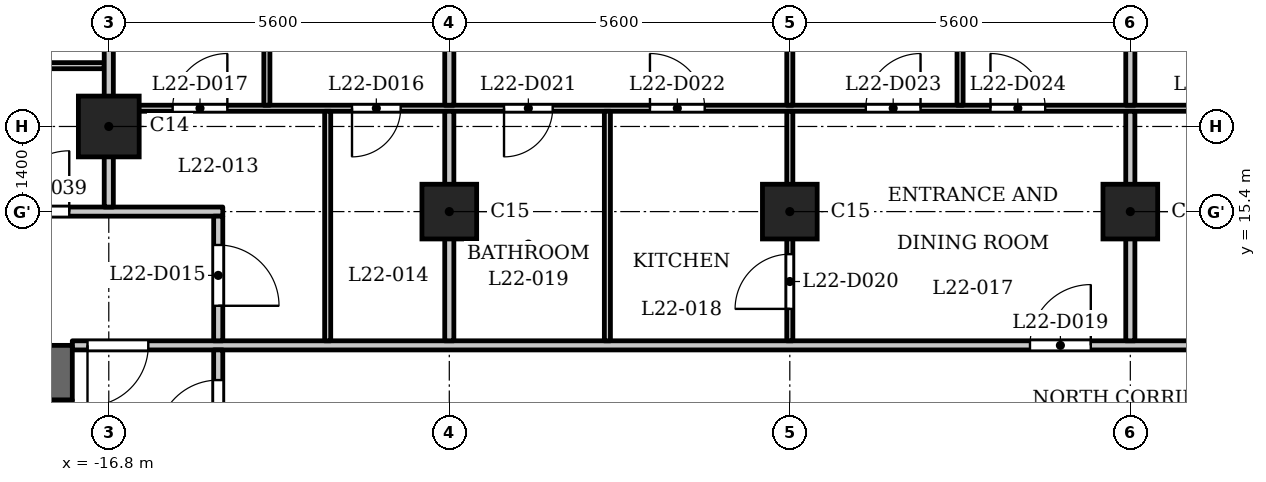
"""IFC4 building model, lengths in metres.
Left out: names, types, materials, properties, quantities, classifications, styles, units other than length and angle.
Written with IfcOpenShell. Run it as: python <this file> out.ifc"""

import sys

from ifc_helpers import new_model, si_unit, direction, frame, frame_2d, origin, origin_2d, place, context, subcontext, project, spatial, rectangle, extrude, element, fill, save


model = new_model("IFC4")
c1 = context("Model", 3, precision=1e-05, world=origin(), true_north=direction((0.0, 1.0)))
c2 = subcontext(c1, "Body", "Model", "MODEL_VIEW")
j1 = project(units=[si_unit("LENGTHUNIT", "METRE"), si_unit("PLANEANGLEUNIT", "RADIAN")], contexts=[c1])
p1 = place(None, origin())
s1 = spatial("IfcSite", under=j1, at=p1, CompositionType="ELEMENT")
p2 = place(p1, origin())
s2 = spatial("IfcBuilding", under=s1, at=p2, CompositionType="ELEMENT")
p3 = place(p2, frame((0.0, 0.0, 90.3)))
s3 = spatial("IfcBuildingStorey", under=s2, at=p3, CompositionType="ELEMENT", Elevation=90.3)
p4 = place(p3, frame((-16.8, 16.8, 0.0), z_axis=(0.0, 0.0, 1.0), x_axis=(1.0, 0.0, 0.0)))
e1 = element("IfcColumn", 1, at=p4, inside=s3, PredefinedType="COLUMN", context=c2, shape_type="SweptSolid", body=[
    extrude(rectangle(XDim=1.0, YDim=1.0, at=origin_2d()), origin(), (0.0, 0.0, 1.0), 3.5),
])
for number, where, z_axis, x_axis in (
    (2, (-11.2, 15.4, 0.0), (0.0, 0.0, 1.0), (1.0, 0.0, 0.0)),
    (3, (-5.6, 15.4, 0.0), (0.0, 0.0, 1.0), (1.0, 0.0, 0.0)),
    (4, (0.0, 15.4, 0.0), (0.0, 0.0, 1.0), (1.0, 0.0, 0.0)),
):
    element("IfcColumn", number, at=place(p3, frame(where, z_axis=z_axis, x_axis=x_axis)), inside=s3, PredefinedType="COLUMN", context=c2, shape_type="SweptSolid", body=[
        extrude(rectangle(XDim=0.9, YDim=0.9, at=origin_2d()), origin(), (0.0, 0.0, 1.0), 3.5),
    ])
p5 = place(p3, frame((-17.4, 12.75, 0.0), z_axis=(0.0, 0.0, 1.0), x_axis=(-1.0, 0.0, 0.0)))
e5 = element("IfcWall", 5, at=p5, inside=s3, PredefinedType="SHEAR", context=c2, shape_type="SweptSolid", body=[
    extrude(rectangle(XDim=10.4, YDim=0.9, at=frame_2d((5.2, 0.0))), origin(), (0.0, 0.0, 1.0), 3.2),
])
p6 = place(p3, frame((-17.6, -12.3, 0.0), z_axis=(0.0, 0.0, 1.0), x_axis=(0.0, 1.0, 0.0)))
e6 = element("IfcWall", 6, at=p6, inside=s3, PredefinedType="SHEAR", context=c2, shape_type="SweptSolid", body=[
    extrude(rectangle(XDim=24.6, YDim=0.4, at=frame_2d((12.3, 0.0))), origin(), (0.0, 0.0, 1.0), 3.2),
])
p7 = place(p6, frame((6.0, 0.0, 0.0)))
e7 = element("IfcOpeningElement", 7, at=p7, cuts=e6, PredefinedType="OPENING", context=c2, shape_type="SweptSolid", body=[
    extrude(rectangle(XDim=1.1, YDim=2.1, at=frame_2d((0.55, 1.05))), frame((0.0, 0.21, 0.0), z_axis=(0.0, -1.0, 0.0), x_axis=(1.0, 0.0, 0.0)), (0.0, 0.0, 1.0), 0.42),
])
p8 = place(p6, frame((8.4, 0.0, 0.0)))
e8 = element("IfcOpeningElement", 8, at=p8, cuts=e6, PredefinedType="OPENING", context=c2, shape_type="SweptSolid", body=[
    extrude(rectangle(XDim=1.1, YDim=2.1, at=frame_2d((0.55, 1.05))), frame((0.0, 0.21, 0.0), z_axis=(0.0, -1.0, 0.0), x_axis=(1.0, 0.0, 0.0)), (0.0, 0.0, 1.0), 0.42),
])
p9 = place(p6, frame((10.8, 0.0, 0.0)))
e9 = element("IfcOpeningElement", 9, at=p9, cuts=e6, PredefinedType="OPENING", context=c2, shape_type="SweptSolid", body=[
    extrude(rectangle(XDim=1.1, YDim=2.1, at=frame_2d((0.55, 1.05))), frame((0.0, 0.21, 0.0), z_axis=(0.0, -1.0, 0.0), x_axis=(1.0, 0.0, 0.0)), (0.0, 0.0, 1.0), 0.42),
])
p10 = place(p6, frame((16.75, 0.0, 0.0)))
e10 = element("IfcOpeningElement", 10, at=p10, cuts=e6, PredefinedType="OPENING", context=c2, shape_type="SweptSolid", body=[
    extrude(rectangle(XDim=0.9, YDim=2.1, at=frame_2d((0.45, 1.05))), frame((0.0, 0.21, 0.0), z_axis=(0.0, -1.0, 0.0), x_axis=(1.0, 0.0, 0.0)), (0.0, 0.0, 1.0), 0.42),
])
p11 = place(p6, frame((22.8, 0.0, 0.0)))
e11 = element("IfcOpeningElement", 11, at=p11, cuts=e6, PredefinedType="OPENING", context=c2, shape_type="SweptSolid", body=[
    extrude(rectangle(XDim=1.1, YDim=2.1, at=frame_2d((0.55, 1.05))), frame((0.0, 0.21, 0.0), z_axis=(0.0, -1.0, 0.0), x_axis=(1.0, 0.0, 0.0)), (0.0, 0.0, 1.0), 0.42),
])
p12 = place(p6, frame((0.7, 0.0, 0.0)))
e12 = element("IfcOpeningElement", 12, at=p12, cuts=e6, PredefinedType="OPENING", context=c2, shape_type="SweptSolid", body=[
    extrude(rectangle(XDim=1.1, YDim=2.1, at=frame_2d((0.55, 1.05))), frame((0.0, 0.21, 0.0), z_axis=(0.0, -1.0, 0.0), x_axis=(1.0, 0.0, 0.0)), (0.0, 0.0, 1.0), 0.42),
])
p13 = place(p6, frame((12.775, 0.0, 0.0)))
e13 = element("IfcOpeningElement", 13, at=p13, cuts=e6, PredefinedType="OPENING", context=c2, shape_type="SweptSolid", body=[
    extrude(rectangle(XDim=1.8, YDim=2.1, at=frame_2d((0.9, 1.05))), frame((0.0, 0.21, 0.0), z_axis=(0.0, -1.0, 0.0), x_axis=(1.0, 0.0, 0.0)), (0.0, 0.0, 1.0), 0.42),
])
p14 = place(p3, frame((-17.4, 13.2, 0.0), z_axis=(0.0, 0.0, 1.0), x_axis=(1.0, 0.0, 0.0)))
e14 = element("IfcWall", 14, at=p14, inside=s3, PredefinedType="PARTITIONING", context=c2, shape_type="SweptSolid", body=[
    extrude(rectangle(XDim=34.8, YDim=0.15, at=frame_2d((17.4, 0.0))), origin(), (0.0, 0.0, 1.0), 3.2),
])
p15 = place(p14, frame((0.25, 0.0, 0.0)))
e15 = element("IfcOpeningElement", 15, at=p15, cuts=e14, PredefinedType="OPENING", context=c2, shape_type="SweptSolid", body=[
    extrude(rectangle(XDim=1.0, YDim=2.1, at=frame_2d((0.5, 1.05))), frame((0.0, 0.085, 0.0), z_axis=(0.0, -1.0, 0.0), x_axis=(1.0, 0.0, 0.0)), (0.0, 0.0, 1.0), 0.17),
])
p16 = place(p14, frame((33.65, 0.0, 0.0)))
e16 = element("IfcOpeningElement", 16, at=p16, cuts=e14, PredefinedType="OPENING", context=c2, shape_type="SweptSolid", body=[
    extrude(rectangle(XDim=1.0, YDim=2.1, at=frame_2d((0.5, 1.05))), frame((0.0, 0.085, 0.0), z_axis=(0.0, -1.0, 0.0), x_axis=(1.0, 0.0, 0.0)), (0.0, 0.0, 1.0), 0.17),
])
p17 = place(p14, frame((15.75, 0.0, 0.0)))
e17 = element("IfcOpeningElement", 17, at=p17, cuts=e14, PredefinedType="OPENING", context=c2, shape_type="SweptSolid", body=[
    extrude(rectangle(XDim=1.0, YDim=2.1, at=frame_2d((0.5, 1.05))), frame((0.0, 0.085, 0.0), z_axis=(0.0, -1.0, 0.0), x_axis=(1.0, 0.0, 0.0)), (0.0, 0.0, 1.0), 0.17),
])
p18 = place(p14, frame((21.35, 0.0, 0.0)))
e18 = element("IfcOpeningElement", 18, at=p18, cuts=e14, PredefinedType="OPENING", context=c2, shape_type="SweptSolid", body=[
    extrude(rectangle(XDim=1.0, YDim=2.1, at=frame_2d((0.5, 1.05))), frame((0.0, 0.085, 0.0), z_axis=(0.0, -1.0, 0.0), x_axis=(1.0, 0.0, 0.0)), (0.0, 0.0, 1.0), 0.17),
])
p19 = place(p3, frame((-27.484, 15.4, 0.0), z_axis=(0.0, 0.0, 1.0), x_axis=(1.0, 0.0, 0.0)))
e19 = element("IfcWall", 19, at=p19, inside=s3, PredefinedType="PARTITIONING", context=c2, shape_type="SweptSolid", body=[
    extrude(rectangle(XDim=12.559, YDim=0.15, at=frame_2d((6.279, 0.0))), origin(), (0.0, 0.0, 1.0), 3.2),
])
p20 = place(p19, frame((9.034, 0.0, 0.0)))
e20 = element("IfcOpeningElement", 20, at=p20, cuts=e19, PredefinedType="OPENING", context=c2, shape_type="SweptSolid", body=[
    extrude(rectangle(XDim=1.0, YDim=2.1, at=frame_2d((0.5, 1.05))), frame((0.0, 0.085, 0.0), z_axis=(0.0, -1.0, 0.0), x_axis=(1.0, 0.0, 0.0)), (0.0, 0.0, 1.0), 0.17),
])
p21 = place(p3, frame((-16.725, 17.1, 0.0), z_axis=(0.0, 0.0, 1.0), x_axis=(1.0, 0.0, 0.0)))
e21 = element("IfcWall", 21, at=p21, inside=s3, PredefinedType="PARTITIONING", context=c2, shape_type="SweptSolid", body=[
    extrude(rectangle(XDim=33.45, YDim=0.1, at=frame_2d((16.725, 0.0))), origin(), (0.0, 0.0, 1.0), 3.2),
])
p22 = place(p21, frame((3.925, 0.0, 0.0)))
e22 = element("IfcOpeningElement", 22, at=p22, cuts=e21, PredefinedType="OPENING", context=c2, shape_type="SweptSolid", body=[
    extrude(rectangle(XDim=0.8, YDim=2.1, at=frame_2d((0.4, 1.05))), frame((0.0, 0.06, 0.0), z_axis=(0.0, -1.0, 0.0), x_axis=(1.0, 0.0, 0.0)), (0.0, 0.0, 1.0), 0.12),
])
p23 = place(p21, frame((0.975, 0.0, 0.0)))
e23 = element("IfcOpeningElement", 23, at=p23, cuts=e21, PredefinedType="OPENING", context=c2, shape_type="SweptSolid", body=[
    extrude(rectangle(XDim=0.9, YDim=2.1, at=frame_2d((0.45, 1.05))), frame((0.0, 0.06, 0.0), z_axis=(0.0, -1.0, 0.0), x_axis=(1.0, 0.0, 0.0)), (0.0, 0.0, 1.0), 0.12),
])
p24 = place(p21, frame((6.425, 0.0, 0.0)))
e24 = element("IfcOpeningElement", 24, at=p24, cuts=e21, PredefinedType="OPENING", context=c2, shape_type="SweptSolid", body=[
    extrude(rectangle(XDim=0.8, YDim=2.1, at=frame_2d((0.4, 1.05))), frame((0.0, 0.06, 0.0), z_axis=(0.0, -1.0, 0.0), x_axis=(1.0, 0.0, 0.0)), (0.0, 0.0, 1.0), 0.12),
])
p25 = place(p21, frame((8.825, 0.0, 0.0)))
e25 = element("IfcOpeningElement", 25, at=p25, cuts=e21, PredefinedType="OPENING", context=c2, shape_type="SweptSolid", body=[
    extrude(rectangle(XDim=0.9, YDim=2.1, at=frame_2d((0.45, 1.05))), frame((0.0, 0.06, 0.0), z_axis=(0.0, -1.0, 0.0), x_axis=(1.0, 0.0, 0.0)), (0.0, 0.0, 1.0), 0.12),
])
p26 = place(p21, frame((12.375, 0.0, 0.0)))
e26 = element("IfcOpeningElement", 26, at=p26, cuts=e21, PredefinedType="OPENING", context=c2, shape_type="SweptSolid", body=[
    extrude(rectangle(XDim=0.9, YDim=2.1, at=frame_2d((0.45, 1.05))), frame((0.0, 0.06, 0.0), z_axis=(0.0, -1.0, 0.0), x_axis=(1.0, 0.0, 0.0)), (0.0, 0.0, 1.0), 0.12),
])
p27 = place(p21, frame((14.425, 0.0, 0.0)))
e27 = element("IfcOpeningElement", 27, at=p27, cuts=e21, PredefinedType="OPENING", context=c2, shape_type="SweptSolid", body=[
    extrude(rectangle(XDim=0.9, YDim=2.1, at=frame_2d((0.45, 1.05))), frame((0.0, 0.06, 0.0), z_axis=(0.0, -1.0, 0.0), x_axis=(1.0, 0.0, 0.0)), (0.0, 0.0, 1.0), 0.12),
])
p28 = place(p21, frame((26.225, 0.0, 0.0)))
e28 = element("IfcOpeningElement", 28, at=p28, cuts=e21, PredefinedType="OPENING", context=c2, shape_type="SweptSolid", body=[
    extrude(rectangle(XDim=0.8, YDim=2.1, at=frame_2d((0.4, 1.05))), frame((0.0, 0.06, 0.0), z_axis=(0.0, -1.0, 0.0), x_axis=(1.0, 0.0, 0.0)), (0.0, 0.0, 1.0), 0.12),
])
p29 = place(p21, frame((23.025, 0.0, 0.0)))
e29 = element("IfcOpeningElement", 29, at=p29, cuts=e21, PredefinedType="OPENING", context=c2, shape_type="SweptSolid", body=[
    extrude(rectangle(XDim=0.9, YDim=2.1, at=frame_2d((0.45, 1.05))), frame((0.0, 0.06, 0.0), z_axis=(0.0, -1.0, 0.0), x_axis=(1.0, 0.0, 0.0)), (0.0, 0.0, 1.0), 0.12),
])
p30 = place(p21, frame((17.775, 0.0, 0.0)))
e30 = element("IfcOpeningElement", 30, at=p30, cuts=e21, PredefinedType="OPENING", context=c2, shape_type="SweptSolid", body=[
    extrude(rectangle(XDim=0.9, YDim=2.1, at=frame_2d((0.45, 1.05))), frame((0.0, 0.06, 0.0), z_axis=(0.0, -1.0, 0.0), x_axis=(1.0, 0.0, 0.0)), (0.0, 0.0, 1.0), 0.12),
])
p31 = place(p21, frame((20.025, 0.0, 0.0)))
e31 = element("IfcOpeningElement", 31, at=p31, cuts=e21, PredefinedType="OPENING", context=c2, shape_type="SweptSolid", body=[
    extrude(rectangle(XDim=0.9, YDim=2.1, at=frame_2d((0.45, 1.05))), frame((0.0, 0.06, 0.0), z_axis=(0.0, -1.0, 0.0), x_axis=(1.0, 0.0, 0.0)), (0.0, 0.0, 1.0), 0.12),
])
p32 = place(p21, frame((28.825, 0.0, 0.0)))
e32 = element("IfcOpeningElement", 32, at=p32, cuts=e21, PredefinedType="OPENING", context=c2, shape_type="SweptSolid", body=[
    extrude(rectangle(XDim=0.8, YDim=2.1, at=frame_2d((0.4, 1.05))), frame((0.0, 0.06, 0.0), z_axis=(0.0, -1.0, 0.0), x_axis=(1.0, 0.0, 0.0)), (0.0, 0.0, 1.0), 0.12),
])
p33 = place(p21, frame((31.975, 0.0, 0.0)))
e33 = element("IfcOpeningElement", 33, at=p33, cuts=e21, PredefinedType="OPENING", context=c2, shape_type="SweptSolid", body=[
    extrude(rectangle(XDim=0.9, YDim=2.1, at=frame_2d((0.45, 1.05))), frame((0.0, 0.06, 0.0), z_axis=(0.0, -1.0, 0.0), x_axis=(1.0, 0.0, 0.0)), (0.0, 0.0, 1.0), 0.12),
])
p34 = place(p3, frame((-26.554, 17.8, 0.0), z_axis=(0.0, 0.0, 1.0), x_axis=(1.0, 0.0, 0.0)))
e34 = element("IfcWall", 34, at=p34, inside=s3, PredefinedType="PARTITIONING", context=c2, shape_type="SweptSolid", body=[
    extrude(rectangle(XDim=9.679, YDim=0.1, at=frame_2d((4.84, 0.0))), origin(), (0.0, 0.0, 1.0), 3.2),
])
p35 = place(p34, frame((2.786, 0.0, 0.0)))
e35 = element("IfcOpeningElement", 35, at=p35, cuts=e34, PredefinedType="OPENING", context=c2, shape_type="SweptSolid", body=[
    extrude(rectangle(XDim=0.8, YDim=2.1, at=frame_2d((0.4, 1.05))), frame((0.0, 0.06, 0.0), z_axis=(0.0, -1.0, 0.0), x_axis=(1.0, 0.0, 0.0)), (0.0, 0.0, 1.0), 0.12),
])
p36 = place(p34, frame((7.204, 0.0, 0.0)))
e36 = element("IfcOpeningElement", 36, at=p36, cuts=e34, PredefinedType="OPENING", context=c2, shape_type="SweptSolid", body=[
    extrude(rectangle(XDim=0.9, YDim=2.1, at=frame_2d((0.45, 1.05))), frame((0.0, 0.06, 0.0), z_axis=(0.0, -1.0, 0.0), x_axis=(1.0, 0.0, 0.0)), (0.0, 0.0, 1.0), 0.12),
])
p37 = place(p3, frame((-16.8, 15.475, 0.0), z_axis=(0.0, 0.0, 1.0), x_axis=(0.0, 1.0, 0.0)))
e37 = element("IfcWall", 37, at=p37, inside=s3, PredefinedType="PARTITIONING", context=c2, shape_type="SweptSolid", body=[
    extrude(rectangle(XDim=7.555, YDim=0.15, at=frame_2d((3.777, 0.0))), origin(), (0.0, 0.0, 1.0), 3.2),
])
p38 = place(p3, frame((-15.0, 6.769, 0.0), z_axis=(0.0, 0.0, 1.0), x_axis=(0.0, 1.0, 0.0)))
e38 = element("IfcWall", 38, at=p38, inside=s3, PredefinedType="PARTITIONING", context=c2, shape_type="SweptSolid", body=[
    extrude(rectangle(XDim=6.356, YDim=0.15, at=frame_2d((3.178, 0.0))), origin(), (0.0, 0.0, 1.0), 3.2),
])
p39 = place(p38, frame((4.86, 0.0, 0.0)))
e39 = element("IfcOpeningElement", 39, at=p39, cuts=e38, PredefinedType="OPENING", context=c2, shape_type="SweptSolid", body=[
    extrude(rectangle(XDim=1.0, YDim=2.1, at=frame_2d((0.5, 1.05))), frame((0.0, 0.085, 0.0), z_axis=(0.0, -1.0, 0.0), x_axis=(1.0, 0.0, 0.0)), (0.0, 0.0, 1.0), 0.17),
])
p40 = place(p3, frame((-15.0, 13.275, 0.0), z_axis=(0.0, 0.0, 1.0), x_axis=(0.0, 1.0, 0.0)))
e40 = element("IfcWall", 40, at=p40, inside=s3, PredefinedType="PARTITIONING", context=c2, shape_type="SweptSolid", body=[
    extrude(rectangle(XDim=2.05, YDim=0.15, at=frame_2d((1.025, 0.0))), origin(), (0.0, 0.0, 1.0), 3.2),
])
p41 = place(p40, frame((0.576, 0.0, 0.0)))
e41 = element("IfcOpeningElement", 41, at=p41, cuts=e40, PredefinedType="OPENING", context=c2, shape_type="SweptSolid", body=[
    extrude(rectangle(XDim=1.0, YDim=2.1, at=frame_2d((0.5, 1.05))), frame((0.0, 0.085, 0.0), z_axis=(0.0, -1.0, 0.0), x_axis=(1.0, 0.0, 0.0)), (0.0, 0.0, 1.0), 0.17),
])
p42 = place(p3, frame((-14.2, 17.15, 0.0), z_axis=(0.0, 0.0, 1.0), x_axis=(0.0, 1.0, 0.0)))
e42 = element("IfcWall", 42, at=p42, inside=s3, PredefinedType="PARTITIONING", context=c2, shape_type="SweptSolid", body=[
    extrude(rectangle(XDim=4.93, YDim=0.1, at=frame_2d((2.465, 0.0))), origin(), (0.0, 0.0, 1.0), 3.2),
])
p43 = place(p42, frame((3.6, 0.0, 0.0)))
e43 = element("IfcOpeningElement", 43, at=p43, cuts=e42, PredefinedType="OPENING", context=c2, shape_type="SweptSolid", body=[
    extrude(rectangle(XDim=0.9, YDim=2.1, at=frame_2d((0.45, 1.05))), frame((0.0, 0.06, 0.0), z_axis=(0.0, -1.0, 0.0), x_axis=(1.0, 0.0, 0.0)), (0.0, 0.0, 1.0), 0.12),
])
p44 = place(p3, frame((-13.2, 13.275, 0.0), z_axis=(0.0, 0.0, 1.0), x_axis=(0.0, 1.0, 0.0)))
e44 = element("IfcWall", 44, at=p44, inside=s3, PredefinedType="PARTITIONING", context=c2, shape_type="SweptSolid", body=[
    extrude(rectangle(XDim=3.775, YDim=0.1, at=frame_2d((1.888, 0.0))), origin(), (0.0, 0.0, 1.0), 3.2),
])
p45 = place(p3, frame((-11.2, 13.275, 0.0), z_axis=(0.0, 0.0, 1.0), x_axis=(0.0, 1.0, 0.0)))
e45 = element("IfcWall", 45, at=p45, inside=s3, PredefinedType="PARTITIONING", context=c2, shape_type="SweptSolid", body=[
    extrude(rectangle(XDim=3.775, YDim=0.15, at=frame_2d((1.888, 0.0))), origin(), (0.0, 0.0, 1.0), 3.2),
])
p46 = place(p3, frame((-11.2, 17.15, 0.0), z_axis=(0.0, 0.0, 1.0), x_axis=(0.0, 1.0, 0.0)))
e46 = element("IfcWall", 46, at=p46, inside=s3, PredefinedType="PARTITIONING", context=c2, shape_type="SweptSolid", body=[
    extrude(rectangle(XDim=5.88, YDim=0.15, at=frame_2d((2.94, 0.0))), origin(), (0.0, 0.0, 1.0), 3.2),
])
p47 = place(p3, frame((-8.6, 13.275, 0.0), z_axis=(0.0, 0.0, 1.0), x_axis=(0.0, 1.0, 0.0)))
e47 = element("IfcWall", 47, at=p47, inside=s3, PredefinedType="PARTITIONING", context=c2, shape_type="SweptSolid", body=[
    extrude(rectangle(XDim=3.775, YDim=0.1, at=frame_2d((1.888, 0.0))), origin(), (0.0, 0.0, 1.0), 3.2),
])
p48 = place(p3, frame((-5.6, 13.275, 0.0), z_axis=(0.0, 0.0, 1.0), x_axis=(0.0, 1.0, 0.0)))
e48 = element("IfcWall", 48, at=p48, inside=s3, PredefinedType="PARTITIONING", context=c2, shape_type="SweptSolid", body=[
    extrude(rectangle(XDim=3.775, YDim=0.1, at=frame_2d((1.888, 0.0))), origin(), (0.0, 0.0, 1.0), 3.2),
])
p49 = place(p48, frame((0.525, 0.0, 0.0)))
e49 = element("IfcOpeningElement", 49, at=p49, cuts=e48, PredefinedType="OPENING", context=c2, shape_type="SweptSolid", body=[
    extrude(rectangle(XDim=0.9, YDim=2.1, at=frame_2d((0.45, 1.05))), frame((0.0, 0.06, 0.0), z_axis=(0.0, -1.0, 0.0), x_axis=(1.0, 0.0, 0.0)), (0.0, 0.0, 1.0), 0.12),
])
p50 = place(p3, frame((-5.6, 17.15, 0.0), z_axis=(0.0, 0.0, 1.0), x_axis=(0.0, 1.0, 0.0)))
e50 = element("IfcWall", 50, at=p50, inside=s3, PredefinedType="PARTITIONING", context=c2, shape_type="SweptSolid", body=[
    extrude(rectangle(XDim=5.88, YDim=0.1, at=frame_2d((2.94, 0.0))), origin(), (0.0, 0.0, 1.0), 3.2),
])
p51 = place(p3, frame((-2.8, 17.15, 0.0), z_axis=(0.0, 0.0, 1.0), x_axis=(0.0, 1.0, 0.0)))
e51 = element("IfcWall", 51, at=p51, inside=s3, PredefinedType="PARTITIONING", context=c2, shape_type="SweptSolid", body=[
    extrude(rectangle(XDim=4.93, YDim=0.1, at=frame_2d((2.465, 0.0))), origin(), (0.0, 0.0, 1.0), 3.2),
])
p52 = place(p3, frame((0.0, 13.275, 0.0), z_axis=(0.0, 0.0, 1.0), x_axis=(0.0, 1.0, 0.0)))
e52 = element("IfcWall", 52, at=p52, inside=s3, PredefinedType="PARTITIONING", context=c2, shape_type="SweptSolid", body=[
    extrude(rectangle(XDim=3.775, YDim=0.15, at=frame_2d((1.888, 0.0))), origin(), (0.0, 0.0, 1.0), 3.2),
])
p53 = place(p3, frame((0.0, 17.15, 0.0), z_axis=(0.0, 0.0, 1.0), x_axis=(0.0, 1.0, 0.0)))
e53 = element("IfcWall", 53, at=p53, inside=s3, PredefinedType="PARTITIONING", context=c2, shape_type="SweptSolid", body=[
    extrude(rectangle(XDim=5.88, YDim=0.15, at=frame_2d((2.94, 0.0))), origin(), (0.0, 0.0, 1.0), 3.2),
])
p54 = place(p39, origin())
e54 = element("IfcDoor", 54, at=p54, inside=s3, OperationType="SINGLE_SWING_RIGHT", PredefinedType="DOOR", context=c2, shape_type="SweptSolid", body=[
    extrude(rectangle(XDim=1.0, YDim=2.1, at=frame_2d((0.5, 1.05))), frame((0.0, 0.025, 0.0), z_axis=(0.0, -1.0, 0.0), x_axis=(1.0, 0.0, 0.0)), (0.0, 0.0, 1.0), 0.05),
])
fill(e39, e54)
p55 = place(p15, origin())
e55 = element("IfcDoor", 55, at=p55, inside=s3, OperationType="SINGLE_SWING_LEFT", PredefinedType="DOOR", context=c2, shape_type="SweptSolid", body=[
    extrude(rectangle(XDim=1.0, YDim=2.1, at=frame_2d((0.5, 1.05))), frame((0.0, 0.025, 0.0), z_axis=(0.0, -1.0, 0.0), x_axis=(1.0, 0.0, 0.0)), (0.0, 0.0, 1.0), 0.05),
])
fill(e15, e55)
p56 = place(p41, origin())
e56 = element("IfcDoor", 56, at=p56, inside=s3, OperationType="SINGLE_SWING_LEFT", PredefinedType="DOOR", context=c2, shape_type="SweptSolid", body=[
    extrude(rectangle(XDim=1.0, YDim=2.1, at=frame_2d((0.5, 1.05))), frame((0.0, 0.025, 0.0), z_axis=(0.0, -1.0, 0.0), x_axis=(1.0, 0.0, 0.0)), (0.0, 0.0, 1.0), 0.05),
])
fill(e41, e56)
p57 = place(p22, origin())
e57 = element("IfcDoor", 57, at=p57, inside=s3, OperationType="SINGLE_SWING_LEFT", PredefinedType="DOOR", context=c2, shape_type="SweptSolid", body=[
    extrude(rectangle(XDim=0.8, YDim=2.1, at=frame_2d((0.4, 1.05))), frame((0.0, 0.025, 0.0), z_axis=(0.0, -1.0, 0.0), x_axis=(1.0, 0.0, 0.0)), (0.0, 0.0, 1.0), 0.05),
])
fill(e22, e57)
p58 = place(p23, origin())
e58 = element("IfcDoor", 58, at=p58, inside=s3, OperationType="SINGLE_SWING_LEFT", PredefinedType="DOOR", context=c2, shape_type="SweptSolid", body=[
    extrude(rectangle(XDim=0.9, YDim=2.1, at=frame_2d((0.45, 1.05))), frame((0.0, 0.025, 0.0), z_axis=(0.0, -1.0, 0.0), x_axis=(1.0, 0.0, 0.0)), (0.0, 0.0, 1.0), 0.05),
])
fill(e23, e58)
p59 = place(p17, origin())
e59 = element("IfcDoor", 59, at=p59, inside=s3, OperationType="SINGLE_SWING_LEFT", PredefinedType="DOOR", context=c2, shape_type="SweptSolid", body=[
    extrude(rectangle(XDim=1.0, YDim=2.1, at=frame_2d((0.5, 1.05))), frame((0.0, 0.025, 0.0), z_axis=(0.0, -1.0, 0.0), x_axis=(1.0, 0.0, 0.0)), (0.0, 0.0, 1.0), 0.05),
])
fill(e17, e59)
p60 = place(p49, origin())
e60 = element("IfcDoor", 60, at=p60, inside=s3, OperationType="SINGLE_SWING_RIGHT", PredefinedType="DOOR", context=c2, shape_type="SweptSolid", body=[
    extrude(rectangle(XDim=0.9, YDim=2.1, at=frame_2d((0.45, 1.05))), frame((0.0, 0.025, 0.0), z_axis=(0.0, -1.0, 0.0), x_axis=(1.0, 0.0, 0.0)), (0.0, 0.0, 1.0), 0.05),
])
fill(e49, e60)
p61 = place(p24, origin())
e61 = element("IfcDoor", 61, at=p61, inside=s3, OperationType="SINGLE_SWING_LEFT", PredefinedType="DOOR", context=c2, shape_type="SweptSolid", body=[
    extrude(rectangle(XDim=0.8, YDim=2.1, at=frame_2d((0.4, 1.05))), frame((0.0, 0.025, 0.0), z_axis=(0.0, -1.0, 0.0), x_axis=(1.0, 0.0, 0.0)), (0.0, 0.0, 1.0), 0.05),
])
fill(e24, e61)
p62 = place(p25, origin())
e62 = element("IfcDoor", 62, at=p62, inside=s3, OperationType="SINGLE_SWING_RIGHT", PredefinedType="DOOR", context=c2, shape_type="SweptSolid", body=[
    extrude(rectangle(XDim=0.9, YDim=2.1, at=frame_2d((0.45, 1.05))), frame((0.0, 0.025, 0.0), z_axis=(0.0, -1.0, 0.0), x_axis=(1.0, 0.0, 0.0)), (0.0, 0.0, 1.0), 0.05),
])
fill(e25, e62)
p63 = place(p26, origin())
e63 = element("IfcDoor", 63, at=p63, inside=s3, OperationType="SINGLE_SWING_LEFT", PredefinedType="DOOR", context=c2, shape_type="SweptSolid", body=[
    extrude(rectangle(XDim=0.9, YDim=2.1, at=frame_2d((0.45, 1.05))), frame((0.0, 0.025, 0.0), z_axis=(0.0, -1.0, 0.0), x_axis=(1.0, 0.0, 0.0)), (0.0, 0.0, 1.0), 0.05),
])
fill(e26, e63)
p64 = place(p27, origin())
e64 = element("IfcDoor", 64, at=p64, inside=s3, OperationType="SINGLE_SWING_RIGHT", PredefinedType="DOOR", context=c2, shape_type="SweptSolid", body=[
    extrude(rectangle(XDim=0.9, YDim=2.1, at=frame_2d((0.45, 1.05))), frame((0.0, 0.025, 0.0), z_axis=(0.0, -1.0, 0.0), x_axis=(1.0, 0.0, 0.0)), (0.0, 0.0, 1.0), 0.05),
])
fill(e27, e64)
p65 = place(p20, origin())
e65 = element("IfcDoor", 65, at=p65, inside=s3, OperationType="SINGLE_SWING_LEFT", PredefinedType="DOOR", context=c2, shape_type="SweptSolid", body=[
    extrude(rectangle(XDim=1.0, YDim=2.1, at=frame_2d((0.5, 1.05))), frame((0.0, 0.025, 0.0), z_axis=(0.0, -1.0, 0.0), x_axis=(1.0, 0.0, 0.0)), (0.0, 0.0, 1.0), 0.05),
])
fill(e20, e65)
save(model, sys.argv[1])
